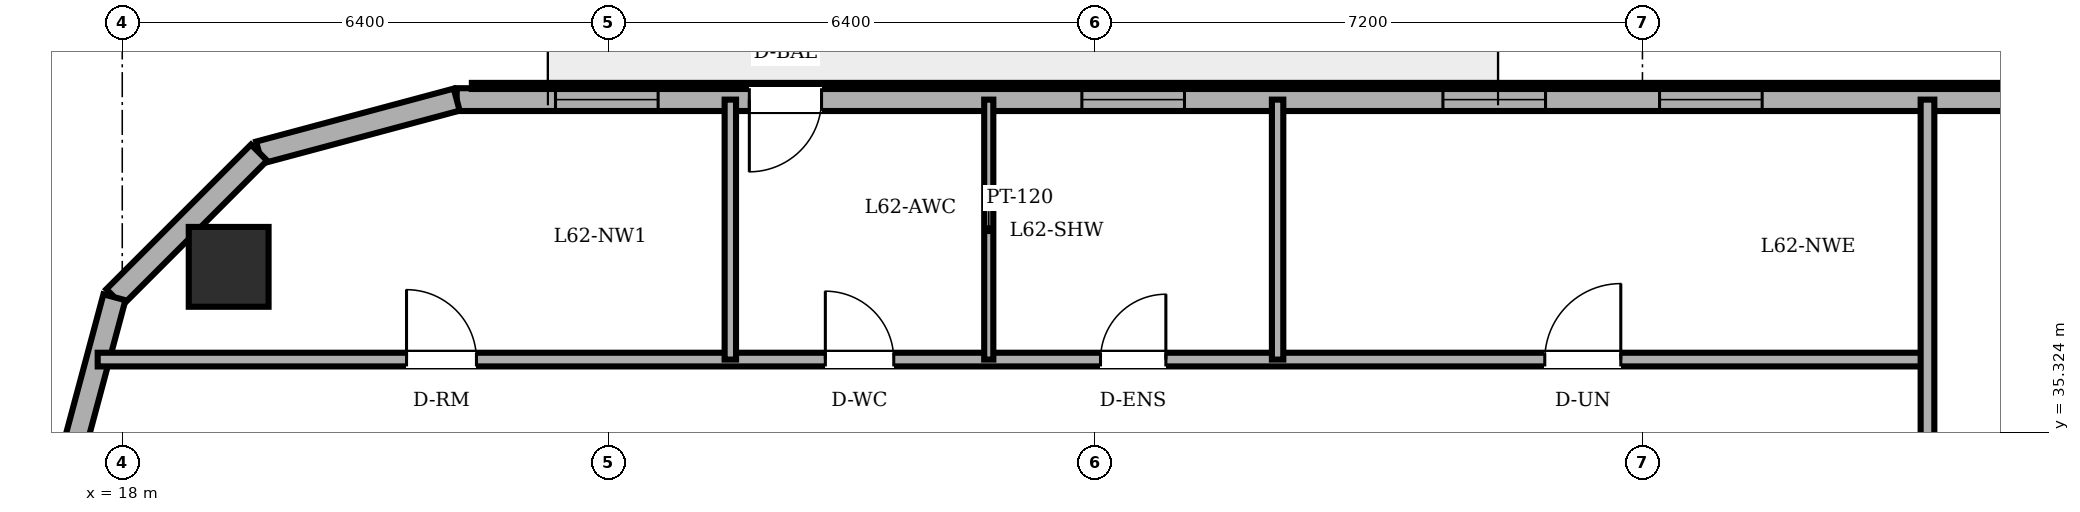
"""IFC4 building model, lengths in metres.
Left out: names, types, materials, properties, quantities, classifications, styles, units other than length and angle.
Written with IfcOpenShell. Run it as: python <this file> out.ifc"""

import sys

from ifc_helpers import new_model, si_unit, direction, frame, frame_2d, origin, origin_2d, place, context, subcontext, project, spatial, rectangle, circle, extrude, element, fill, save


model = new_model("IFC4")
c1 = context("Model", 3, precision=1e-05, world=origin(), true_north=direction((0.0, 1.0)))
c2 = subcontext(c1, "Body", "Model", "MODEL_VIEW")
j1 = project(units=[si_unit("LENGTHUNIT", "METRE"), si_unit("PLANEANGLEUNIT", "RADIAN")], contexts=[c1])
p1 = place(None, origin())
s1 = spatial("IfcSite", under=j1, at=p1, CompositionType="ELEMENT")
p2 = place(p1, origin())
s2 = spatial("IfcBuilding", under=s1, at=p2, CompositionType="ELEMENT")
p3 = place(p2, frame((0.0, 0.0, 237.3)))
s3 = spatial("IfcBuildingStorey", under=s2, at=p3, CompositionType="ELEMENT", Elevation=237.3)
p4 = place(p3, frame((19.4, 37.5, 0.0), z_axis=(0.0, 0.0, 1.0), x_axis=(1.0, 0.0, 0.0)))
e1 = element("IfcColumn", 1, at=p4, inside=s3, PredefinedType="COLUMN", context=c2, shape_type="SweptSolid", body=[
    extrude(circle(Radius=0.525, at=origin_2d()), origin(), (0.0, 0.0, 1.0), 3.6),
])
p5 = place(p3, frame((54.885, 39.7, 0.0), z_axis=(0.0, 0.0, 1.0), x_axis=(-1.0, 0.0, 0.0)))
e2 = element("IfcWall", 2, at=p5, inside=s3, PredefinedType="SOLIDWALL", context=c2, shape_type="SweptSolid", body=[
    extrude(rectangle(XDim=32.485, YDim=0.3, at=frame_2d((16.243, 0.0))), origin(), (0.0, 0.0, 1.0), 3.4),
])
p6 = place(p5, frame((27.685, 0.0, 0.0)))
e3 = element("IfcOpeningElement", 3, at=p6, cuts=e2, PredefinedType="OPENING", context=c2, shape_type="SweptSolid", body=[
    extrude(rectangle(XDim=0.95, YDim=2.2, at=frame_2d((0.475, 1.1))), frame((0.0, 0.16, 0.0), z_axis=(0.0, -1.0, 0.0), x_axis=(1.0, 0.0, 0.0)), (0.0, 0.0, 1.0), 0.32),
])
p7 = place(p5, frame((3.937, 0.0, 0.85)))
e4 = element("IfcOpeningElement", 4, at=p7, cuts=e2, PredefinedType="OPENING", context=c2, shape_type="SweptSolid", body=[
    extrude(rectangle(XDim=1.35, YDim=1.55, at=frame_2d((0.675, 0.775))), frame((0.0, 0.16, 0.0), z_axis=(0.0, -1.0, 0.0), x_axis=(1.0, 0.0, 0.0)), (0.0, 0.0, 1.0), 0.32),
])
p8 = place(p5, frame((8.198, 0.0, 0.85)))
e5 = element("IfcOpeningElement", 5, at=p8, cuts=e2, PredefinedType="OPENING", context=c2, shape_type="SweptSolid", body=[
    extrude(rectangle(XDim=1.35, YDim=1.55, at=frame_2d((0.675, 0.775))), frame((0.0, 0.16, 0.0), z_axis=(0.0, -1.0, 0.0), x_axis=(1.0, 0.0, 0.0)), (0.0, 0.0, 1.0), 0.32),
])
p9 = place(p5, frame((15.31, 0.0, 0.85)))
e6 = element("IfcOpeningElement", 6, at=p9, cuts=e2, PredefinedType="OPENING", context=c2, shape_type="SweptSolid", body=[
    extrude(rectangle(XDim=1.35, YDim=1.55, at=frame_2d((0.675, 0.775))), frame((0.0, 0.16, 0.0), z_axis=(0.0, -1.0, 0.0), x_axis=(1.0, 0.0, 0.0)), (0.0, 0.0, 1.0), 0.32),
])
p10 = place(p5, frame((18.16, 0.0, 0.85)))
e7 = element("IfcOpeningElement", 7, at=p10, cuts=e2, PredefinedType="OPENING", context=c2, shape_type="SweptSolid", body=[
    extrude(rectangle(XDim=1.35, YDim=1.55, at=frame_2d((0.675, 0.775))), frame((0.0, 0.16, 0.0), z_axis=(0.0, -1.0, 0.0), x_axis=(1.0, 0.0, 0.0)), (0.0, 0.0, 1.0), 0.32),
])
p11 = place(p5, frame((22.91, 0.0, 0.85)))
e8 = element("IfcOpeningElement", 8, at=p11, cuts=e2, PredefinedType="OPENING", context=c2, shape_type="SweptSolid", body=[
    extrude(rectangle(XDim=1.35, YDim=1.55, at=frame_2d((0.675, 0.775))), frame((0.0, 0.16, 0.0), z_axis=(0.0, -1.0, 0.0), x_axis=(1.0, 0.0, 0.0)), (0.0, 0.0, 1.0), 0.32),
])
p12 = place(p5, frame((29.835, 0.0, 0.85)))
e9 = element("IfcOpeningElement", 9, at=p12, cuts=e2, PredefinedType="OPENING", context=c2, shape_type="SweptSolid", body=[
    extrude(rectangle(XDim=1.35, YDim=1.55, at=frame_2d((0.675, 0.775))), frame((0.0, 0.16, 0.0), z_axis=(0.0, -1.0, 0.0), x_axis=(1.0, 0.0, 0.0)), (0.0, 0.0, 1.0), 0.32),
])
p13 = place(p3, frame((22.4, 39.7, 0.0), z_axis=(0.0, 0.0, 1.0), x_axis=(-0.965889330541, -0.258955210695, 0.0)))
e10 = element("IfcWall", 10, at=p13, inside=s3, PredefinedType="SOLIDWALL", context=c2, shape_type="SweptSolid", body=[
    extrude(rectangle(XDim=2.692, YDim=0.3, at=frame_2d((1.346, 0.0))), origin(), (0.0, 0.0, 1.0), 3.4),
])
p14 = place(p3, frame((19.8, 39.003, 0.0), z_axis=(0.0, 0.0, 1.0), x_axis=(-0.707152139074, -0.70706142039, 0.0)))
e11 = element("IfcWall", 11, at=p14, inside=s3, PredefinedType="SOLIDWALL", context=c2, shape_type="SweptSolid", body=[
    extrude(rectangle(XDim=2.691, YDim=0.3, at=frame_2d((1.346, 0.0))), origin(), (0.0, 0.0, 1.0), 3.4),
])
p15 = place(p3, frame((17.897, 37.1, 0.0), z_axis=(0.0, 0.0, 1.0), x_axis=(-0.258932525951, -0.965895412042, 0.0)))
e12 = element("IfcWall", 12, at=p15, inside=s3, PredefinedType="SOLIDWALL", context=c2, shape_type="SweptSolid", body=[
    extrude(rectangle(XDim=2.692, YDim=0.3, at=frame_2d((1.346, 0.0))), origin(), (0.0, 0.0, 1.0), 3.4),
])
p16 = place(p3, frame((17.677, 36.28, 0.0), z_axis=(0.0, 0.0, 1.0), x_axis=(1.0, 0.0, 0.0)))
e13 = element("IfcWall", 13, at=p16, inside=s3, PredefinedType="PARTITIONING", context=c2, shape_type="SweptSolid", body=[
    extrude(rectangle(XDim=24.073, YDim=0.18, at=frame_2d((12.037, 0.0))), origin(), (0.0, 0.0, 1.0), 3.4),
])
p17 = place(p16, frame((9.573, 0.0, 0.0)))
e14 = element("IfcOpeningElement", 14, at=p17, cuts=e13, PredefinedType="OPENING", context=c2, shape_type="SweptSolid", body=[
    extrude(rectangle(XDim=0.9, YDim=2.1, at=frame_2d((0.45, 1.05))), frame((0.0, 0.1, 0.0), z_axis=(0.0, -1.0, 0.0), x_axis=(1.0, 0.0, 0.0)), (0.0, 0.0, 1.0), 0.2),
])
p18 = place(p16, frame((13.193, 0.0, 0.0)))
e15 = element("IfcOpeningElement", 15, at=p18, cuts=e13, PredefinedType="OPENING", context=c2, shape_type="SweptSolid", body=[
    extrude(rectangle(XDim=0.86, YDim=2.1, at=frame_2d((0.43, 1.05))), frame((0.0, 0.1, 0.0), z_axis=(0.0, -1.0, 0.0), x_axis=(1.0, 0.0, 0.0)), (0.0, 0.0, 1.0), 0.2),
])
p19 = place(p16, frame((4.063, 0.0, 0.0)))
e16 = element("IfcOpeningElement", 16, at=p19, cuts=e13, PredefinedType="OPENING", context=c2, shape_type="SweptSolid", body=[
    extrude(rectangle(XDim=0.92, YDim=2.1, at=frame_2d((0.46, 1.05))), frame((0.0, 0.1, 0.0), z_axis=(0.0, -1.0, 0.0), x_axis=(1.0, 0.0, 0.0)), (0.0, 0.0, 1.0), 0.2),
])
p20 = place(p16, frame((19.038, 0.0, 0.0)))
e17 = element("IfcOpeningElement", 17, at=p20, cuts=e13, PredefinedType="OPENING", context=c2, shape_type="SweptSolid", body=[
    extrude(rectangle(XDim=1.0, YDim=2.15, at=frame_2d((0.5, 1.075))), frame((0.0, 0.1, 0.0), z_axis=(0.0, -1.0, 0.0), x_axis=(1.0, 0.0, 0.0)), (0.0, 0.0, 1.0), 0.2),
])
p21 = place(p3, frame((26.0, 36.28, 0.0), z_axis=(0.0, 0.0, 1.0), x_axis=(0.0, 1.0, 0.0)))
e18 = element("IfcWall", 18, at=p21, inside=s3, PredefinedType="PARTITIONING", context=c2, shape_type="SweptSolid", body=[
    extrude(rectangle(XDim=3.42, YDim=0.15, at=frame_2d((1.71, 0.0))), origin(), (0.0, 0.0, 1.0), 3.4),
])
p22 = place(p3, frame((29.4, 36.28, 0.0), z_axis=(0.0, 0.0, 1.0), x_axis=(0.0, 1.0, 0.0)))
e19 = element("IfcWall", 19, at=p22, inside=s3, PredefinedType="PARTITIONING", context=c2, shape_type="SweptSolid", body=[
    extrude(rectangle(XDim=3.42, YDim=0.12, at=frame_2d((1.71, 0.0))), origin(), (0.0, 0.0, 1.0), 3.4),
])
p23 = place(p3, frame((33.2, 36.28, 0.0), z_axis=(0.0, 0.0, 1.0), x_axis=(0.0, 1.0, 0.0)))
e20 = element("IfcWall", 20, at=p23, inside=s3, PredefinedType="PARTITIONING", context=c2, shape_type="SweptSolid", body=[
    extrude(rectangle(XDim=3.42, YDim=0.15, at=frame_2d((1.71, 0.0))), origin(), (0.0, 0.0, 1.0), 3.4),
])
p24 = place(p3, frame((41.75, 25.18, 0.0), z_axis=(0.0, 0.0, 1.0), x_axis=(0.0, 1.0, 0.0)))
e21 = element("IfcWall", 21, at=p24, inside=s3, PredefinedType="PARTITIONING", context=c2, shape_type="SweptSolid", body=[
    extrude(rectangle(XDim=14.52, YDim=0.18, at=frame_2d((7.26, 0.0))), origin(), (0.0, 0.0, 1.0), 3.4),
])
p25 = place(p6, origin())
e22 = element("IfcDoor", 22, at=p25, inside=s3, OperationType="SINGLE_SWING_RIGHT", PredefinedType="DOOR", context=c2, shape_type="SweptSolid", body=[
    extrude(rectangle(XDim=0.95, YDim=2.2, at=frame_2d((0.475, 1.1))), frame((0.0, 0.025, 0.0), z_axis=(0.0, -1.0, 0.0), x_axis=(1.0, 0.0, 0.0)), (0.0, 0.0, 1.0), 0.05),
])
fill(e3, e22)
p26 = place(p9, origin())
e23 = element("IfcWindow", 23, at=p26, inside=s3, PartitioningType="SINGLE_PANEL", PredefinedType="WINDOW", context=c2, shape_type="SweptSolid", body=[
    extrude(rectangle(XDim=1.35, YDim=1.55, at=frame_2d((0.675, 0.775))), frame((0.0, 0.03, 0.0), z_axis=(0.0, -1.0, 0.0), x_axis=(1.0, 0.0, 0.0)), (0.0, 0.0, 1.0), 0.06),
])
fill(e6, e23)
p27 = place(p10, origin())
e24 = element("IfcWindow", 24, at=p27, inside=s3, PartitioningType="SINGLE_PANEL", PredefinedType="WINDOW", context=c2, shape_type="SweptSolid", body=[
    extrude(rectangle(XDim=1.35, YDim=1.55, at=frame_2d((0.675, 0.775))), frame((0.0, 0.03, 0.0), z_axis=(0.0, -1.0, 0.0), x_axis=(1.0, 0.0, 0.0)), (0.0, 0.0, 1.0), 0.06),
])
fill(e7, e24)
p28 = place(p11, origin())
e25 = element("IfcWindow", 25, at=p28, inside=s3, PartitioningType="SINGLE_PANEL", PredefinedType="WINDOW", context=c2, shape_type="SweptSolid", body=[
    extrude(rectangle(XDim=1.35, YDim=1.55, at=frame_2d((0.675, 0.775))), frame((0.0, 0.03, 0.0), z_axis=(0.0, -1.0, 0.0), x_axis=(1.0, 0.0, 0.0)), (0.0, 0.0, 1.0), 0.06),
])
fill(e8, e25)
p29 = place(p12, origin())
e26 = element("IfcWindow", 26, at=p29, inside=s3, PartitioningType="SINGLE_PANEL", PredefinedType="WINDOW", context=c2, shape_type="SweptSolid", body=[
    extrude(rectangle(XDim=1.35, YDim=1.55, at=frame_2d((0.675, 0.775))), frame((0.0, 0.03, 0.0), z_axis=(0.0, -1.0, 0.0), x_axis=(1.0, 0.0, 0.0)), (0.0, 0.0, 1.0), 0.06),
])
fill(e9, e26)
p30 = place(p17, origin())
e27 = element("IfcDoor", 27, at=p30, inside=s3, OperationType="SINGLE_SWING_LEFT", PredefinedType="DOOR", context=c2, shape_type="SweptSolid", body=[
    extrude(rectangle(XDim=0.9, YDim=2.1, at=frame_2d((0.45, 1.05))), frame((0.0, 0.025, 0.0), z_axis=(0.0, -1.0, 0.0), x_axis=(1.0, 0.0, 0.0)), (0.0, 0.0, 1.0), 0.05),
])
fill(e14, e27)
p31 = place(p18, origin())
e28 = element("IfcDoor", 28, at=p31, inside=s3, OperationType="SINGLE_SWING_RIGHT", PredefinedType="DOOR", context=c2, shape_type="SweptSolid", body=[
    extrude(rectangle(XDim=0.86, YDim=2.1, at=frame_2d((0.43, 1.05))), frame((0.0, 0.025, 0.0), z_axis=(0.0, -1.0, 0.0), x_axis=(1.0, 0.0, 0.0)), (0.0, 0.0, 1.0), 0.05),
])
fill(e15, e28)
p32 = place(p19, origin())
e29 = element("IfcDoor", 29, at=p32, inside=s3, OperationType="SINGLE_SWING_LEFT", PredefinedType="DOOR", context=c2, shape_type="SweptSolid", body=[
    extrude(rectangle(XDim=0.92, YDim=2.1, at=frame_2d((0.46, 1.05))), frame((0.0, 0.025, 0.0), z_axis=(0.0, -1.0, 0.0), x_axis=(1.0, 0.0, 0.0)), (0.0, 0.0, 1.0), 0.05),
])
fill(e16, e29)
p33 = place(p20, origin())
e30 = element("IfcDoor", 30, at=p33, inside=s3, OperationType="SINGLE_SWING_RIGHT", PredefinedType="DOOR", context=c2, shape_type="SweptSolid", body=[
    extrude(rectangle(XDim=1.0, YDim=2.15, at=frame_2d((0.5, 1.075))), frame((0.0, 0.025, 0.0), z_axis=(0.0, -1.0, 0.0), x_axis=(1.0, 0.0, 0.0)), (0.0, 0.0, 1.0), 0.05),
])
fill(e17, e30)
save(model, sys.argv[1])
